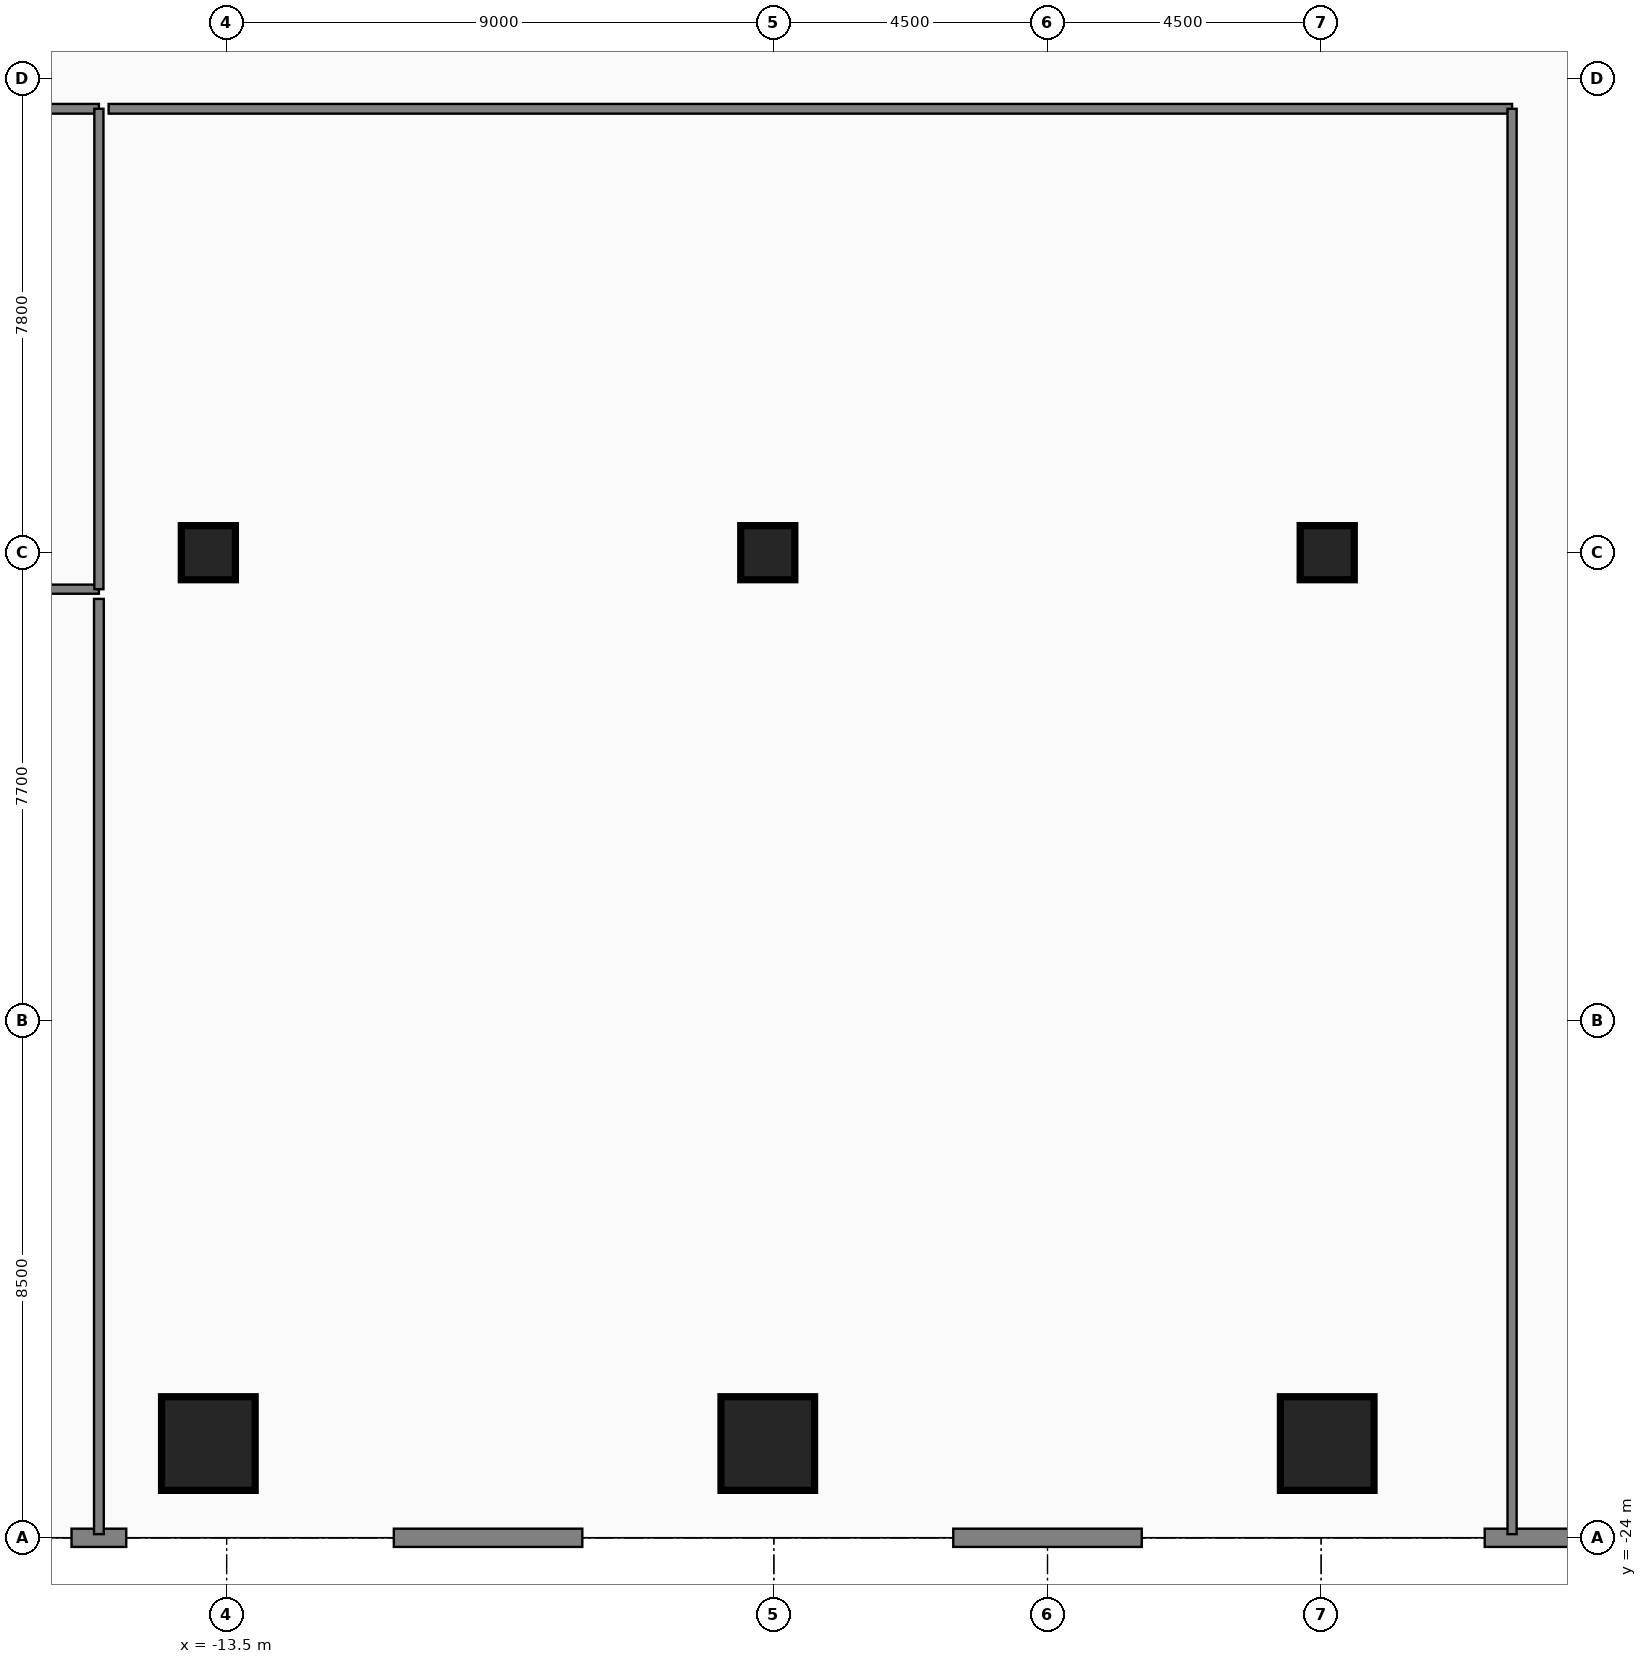
"""IFC4 building model, lengths in metres.
Left out: names, types, materials, properties, quantities, classifications, styles, units other than length and angle.
Written with IfcOpenShell. Run it as: python <this file> out.ifc"""

import sys

from ifc_helpers import new_model, si_unit, direction, frame, frame_2d, origin, origin_2d, place, context, subcontext, project, spatial, rectangle, extrude, element, fill, save


model = new_model("IFC4")
c1 = context("Model", 3, precision=1e-05, world=origin(), true_north=direction((0.0, 1.0)))
c2 = subcontext(c1, "Body", "Model", "MODEL_VIEW")
j1 = project(units=[si_unit("LENGTHUNIT", "METRE"), si_unit("PLANEANGLEUNIT", "RADIAN")], contexts=[c1])
p1 = place(None, origin())
s1 = spatial("IfcSite", under=j1, at=p1, CompositionType="ELEMENT")
p2 = place(p1, origin())
s2 = spatial("IfcBuilding", under=s1, at=p2, CompositionType="ELEMENT")
p3 = place(p2, origin())
s3 = spatial("IfcBuildingStorey", under=s2, at=p3, CompositionType="ELEMENT", Elevation=0.0)
for number, where, z_axis, x_axis in (
    (1, (-13.8, -22.45, 0.0), (0.0, 0.0, 1.0), (1.0, 0.0, 0.0)),
    (2, (-4.6, -22.45, 0.0), (0.0, 0.0, 1.0), (1.0, 0.0, 0.0)),
    (3, (4.6, -22.45, 0.0), (0.0, 0.0, 1.0), (1.0, 0.0, 0.0)),
):
    element("IfcColumn", number, at=place(p3, frame(where, z_axis=z_axis, x_axis=x_axis)), inside=s3, PredefinedType="COLUMN", context=c2, shape_type="SweptSolid", body=[
        extrude(rectangle(XDim=1.5, YDim=1.5, at=origin_2d()), origin(), (0.0, 0.0, 1.0), 6.0),
    ])
for number, where, z_axis, x_axis in (
    (4, (-13.8, -7.8, 0.0), (0.0, 0.0, 1.0), (1.0, 0.0, 0.0)),
    (5, (-4.6, -7.8, 0.0), (0.0, 0.0, 1.0), (1.0, 0.0, 0.0)),
    (6, (4.6, -7.8, 0.0), (0.0, 0.0, 1.0), (1.0, 0.0, 0.0)),
):
    element("IfcColumn", number, at=place(p3, frame(where, z_axis=z_axis, x_axis=x_axis)), inside=s3, PredefinedType="COLUMN", context=c2, shape_type="SweptSolid", body=[
        extrude(rectangle(XDim=0.85, YDim=0.85, at=origin_2d()), origin(), (0.0, 0.0, 1.0), 6.0),
    ])
p4 = place(p3, frame((10.75, -24.0, 0.0), z_axis=(0.0, 0.0, 1.0), x_axis=(-1.0, 0.0, 0.0)))
e7 = element("IfcWall", 7, at=p4, inside=s3, PredefinedType="STANDARD", context=c2, shape_type="SweptSolid", body=[
    extrude(rectangle(XDim=3.56, YDim=0.3, at=frame_2d((1.78, 0.0))), origin(), (0.0, 0.0, 1.0), 5.75),
])
p5 = place(p4, frame((0.65, 0.0, 0.0)))
e8 = element("IfcOpeningElement", 8, at=p5, cuts=e7, PredefinedType="OPENING", context=c2, shape_type="SweptSolid", body=[
    extrude(rectangle(XDim=1.8, YDim=2.4, at=frame_2d((0.9, 1.2))), frame((0.0, 0.16, 0.0), z_axis=(0.0, -1.0, 0.0), x_axis=(1.0, 0.0, 0.0)), (0.0, 0.0, 1.0), 0.32),
])
p6 = place(p3, frame((1.55, -24.0, 0.0), z_axis=(0.0, 0.0, 1.0), x_axis=(-1.0, 0.0, 0.0)))
e9 = element("IfcWall", 9, at=p6, inside=s3, PredefinedType="STANDARD", context=c2, shape_type="SweptSolid", body=[
    extrude(rectangle(XDim=3.1, YDim=0.3, at=frame_2d((1.55, 0.0))), origin(), (0.0, 0.0, 1.0), 5.75),
])
p7 = place(p6, frame((0.65, 0.0, 0.0)))
e10 = element("IfcOpeningElement", 10, at=p7, cuts=e9, PredefinedType="OPENING", context=c2, shape_type="SweptSolid", body=[
    extrude(rectangle(XDim=1.8, YDim=2.4, at=frame_2d((0.9, 1.2))), frame((0.0, 0.16, 0.0), z_axis=(0.0, -1.0, 0.0), x_axis=(1.0, 0.0, 0.0)), (0.0, 0.0, 1.0), 0.32),
])
p8 = place(p3, frame((-7.65, -24.0, 0.0), z_axis=(0.0, 0.0, 1.0), x_axis=(-1.0, 0.0, 0.0)))
e11 = element("IfcWall", 11, at=p8, inside=s3, PredefinedType="STANDARD", context=c2, shape_type="SweptSolid", body=[
    extrude(rectangle(XDim=3.1, YDim=0.3, at=frame_2d((1.55, 0.0))), origin(), (0.0, 0.0, 1.0), 5.75),
])
p9 = place(p8, frame((0.65, 0.0, 0.0)))
e12 = element("IfcOpeningElement", 12, at=p9, cuts=e11, PredefinedType="OPENING", context=c2, shape_type="SweptSolid", body=[
    extrude(rectangle(XDim=1.8, YDim=2.4, at=frame_2d((0.9, 1.2))), frame((0.0, 0.16, 0.0), z_axis=(0.0, -1.0, 0.0), x_axis=(1.0, 0.0, 0.0)), (0.0, 0.0, 1.0), 0.32),
])
p10 = place(p3, frame((-15.15, -24.0, 0.0), z_axis=(0.0, 0.0, 1.0), x_axis=(-1.0, 0.0, 0.0)))
e13 = element("IfcWall", 13, at=p10, inside=s3, PredefinedType="STANDARD", context=c2, shape_type="SweptSolid", body=[
    extrude(rectangle(XDim=0.9, YDim=0.3, at=frame_2d((0.45, 0.0))), origin(), (0.0, 0.0, 1.0), 5.75),
])
p11 = place(p3, frame((-27.9, -0.5, 0.0), z_axis=(0.0, 0.0, 1.0), x_axis=(1.0, 0.0, 0.0)))
e14 = element("IfcWall", 14, at=p11, inside=s3, PredefinedType="PARTITIONING", context=c2, shape_type="SweptSolid", body=[
    extrude(rectangle(XDim=12.3, YDim=0.16, at=frame_2d((6.15, 0.0))), origin(), (0.0, 0.0, 1.0), 5.75),
])
p12 = place(p11, frame((7.01, 0.0, 0.0)))
e15 = element("IfcOpeningElement", 15, at=p12, cuts=e14, PredefinedType="OPENING", context=c2, shape_type="SweptSolid", body=[
    extrude(rectangle(XDim=1.08, YDim=2.18, at=frame_2d((0.54, 1.09))), frame((0.0, 0.09, 0.0), z_axis=(0.0, -1.0, 0.0), x_axis=(1.0, 0.0, 0.0)), (0.0, 0.0, 1.0), 0.18),
])
p13 = place(p3, frame((-15.6, -23.94, 0.0), z_axis=(0.0, 0.0, 1.0), x_axis=(0.0, 1.0, 0.0)))
e16 = element("IfcWall", 16, at=p13, inside=s3, PredefinedType="PARTITIONING", context=c2, shape_type="SweptSolid", body=[
    extrude(rectangle(XDim=15.38, YDim=0.16, at=frame_2d((7.69, 0.0))), origin(), (0.0, 0.0, 1.0), 5.75),
])
p14 = place(p13, frame((7.15, 0.0, 0.0)))
e17 = element("IfcOpeningElement", 17, at=p14, cuts=e16, PredefinedType="OPENING", context=c2, shape_type="SweptSolid", body=[
    extrude(rectangle(XDim=1.08, YDim=2.18, at=frame_2d((0.54, 1.09))), frame((0.0, 0.09, 0.0), z_axis=(0.0, -1.0, 0.0), x_axis=(1.0, 0.0, 0.0)), (0.0, 0.0, 1.0), 0.18),
])
p15 = place(p3, frame((-15.44, -0.5, 0.0), z_axis=(0.0, 0.0, 1.0), x_axis=(1.0, 0.0, 0.0)))
e18 = element("IfcWall", 18, at=p15, inside=s3, PredefinedType="PARTITIONING", context=c2, shape_type="SweptSolid", body=[
    extrude(rectangle(XDim=23.08, YDim=0.16, at=frame_2d((11.54, 0.0))), origin(), (0.0, 0.0, 1.0), 5.75),
])
p16 = place(p15, frame((12.65, 0.0, 0.0)))
e19 = element("IfcOpeningElement", 19, at=p16, cuts=e18, PredefinedType="OPENING", context=c2, shape_type="SweptSolid", body=[
    extrude(rectangle(XDim=1.08, YDim=2.18, at=frame_2d((0.54, 1.09))), frame((0.0, 0.09, 0.0), z_axis=(0.0, -1.0, 0.0), x_axis=(1.0, 0.0, 0.0)), (0.0, 0.0, 1.0), 0.18),
])
p17 = place(p3, frame((-27.9, -8.4, 0.0), z_axis=(0.0, 0.0, 1.0), x_axis=(1.0, 0.0, 0.0)))
e20 = element("IfcWall", 20, at=p17, inside=s3, PredefinedType="PARTITIONING", context=c2, shape_type="SweptSolid", body=[
    extrude(rectangle(XDim=12.3, YDim=0.15, at=frame_2d((6.15, 0.0))), origin(), (0.0, 0.0, 1.0), 5.75),
])
p18 = place(p3, frame((-15.6, -8.4, 0.0), z_axis=(0.0, 0.0, 1.0), x_axis=(0.0, 1.0, 0.0)))
e21 = element("IfcWall", 21, at=p18, inside=s3, PredefinedType="PARTITIONING", context=c2, shape_type="SweptSolid", body=[
    extrude(rectangle(XDim=7.9, YDim=0.15, at=frame_2d((3.95, 0.0))), origin(), (0.0, 0.0, 1.0), 5.75),
])
p19 = place(p3, frame((7.64, -23.94, 0.0), z_axis=(0.0, 0.0, 1.0), x_axis=(0.0, 1.0, 0.0)))
e22 = element("IfcWall", 22, at=p19, inside=s3, PredefinedType="PARTITIONING", context=c2, shape_type="SweptSolid", body=[
    extrude(rectangle(XDim=23.44, YDim=0.15, at=frame_2d((11.72, 0.0))), origin(), (0.0, 0.0, 1.0), 5.75),
])
p20 = place(p5, origin())
e23 = element("IfcDoor", 23, at=p20, inside=s3, OperationType="DOUBLE_DOOR_SINGLE_SWING", PredefinedType="DOOR", context=c2, shape_type="SweptSolid", body=[
    extrude(rectangle(XDim=1.8, YDim=2.4, at=frame_2d((0.9, 1.2))), frame((0.0, 0.025, 0.0), z_axis=(0.0, -1.0, 0.0), x_axis=(1.0, 0.0, 0.0)), (0.0, 0.0, 1.0), 0.05),
])
fill(e8, e23)
p21 = place(p7, origin())
e24 = element("IfcDoor", 24, at=p21, inside=s3, OperationType="DOUBLE_DOOR_SINGLE_SWING", PredefinedType="DOOR", context=c2, shape_type="SweptSolid", body=[
    extrude(rectangle(XDim=1.8, YDim=2.4, at=frame_2d((0.9, 1.2))), frame((0.0, 0.025, 0.0), z_axis=(0.0, -1.0, 0.0), x_axis=(1.0, 0.0, 0.0)), (0.0, 0.0, 1.0), 0.05),
])
fill(e10, e24)
p22 = place(p9, origin())
e25 = element("IfcDoor", 25, at=p22, inside=s3, OperationType="DOUBLE_DOOR_SINGLE_SWING", PredefinedType="DOOR", context=c2, shape_type="SweptSolid", body=[
    extrude(rectangle(XDim=1.8, YDim=2.4, at=frame_2d((0.9, 1.2))), frame((0.0, 0.025, 0.0), z_axis=(0.0, -1.0, 0.0), x_axis=(1.0, 0.0, 0.0)), (0.0, 0.0, 1.0), 0.05),
])
fill(e12, e25)
p23 = place(p14, origin())
e26 = element("IfcDoor", 26, at=p23, inside=s3, OperationType="SINGLE_SWING_RIGHT", PredefinedType="DOOR", context=c2, shape_type="SweptSolid", body=[
    extrude(rectangle(XDim=1.08, YDim=2.18, at=frame_2d((0.54, 1.09))), frame((0.0, 0.025, 0.0), z_axis=(0.0, -1.0, 0.0), x_axis=(1.0, 0.0, 0.0)), (0.0, 0.0, 1.0), 0.05),
])
fill(e17, e26)
p24 = place(p16, origin())
e27 = element("IfcDoor", 27, at=p24, inside=s3, OperationType="SINGLE_SWING_LEFT", PredefinedType="DOOR", context=c2, shape_type="SweptSolid", body=[
    extrude(rectangle(XDim=1.08, YDim=2.18, at=frame_2d((0.54, 1.09))), frame((0.0, 0.025, 0.0), z_axis=(0.0, -1.0, 0.0), x_axis=(1.0, 0.0, 0.0)), (0.0, 0.0, 1.0), 0.05),
])
fill(e19, e27)
save(model, sys.argv[1])
